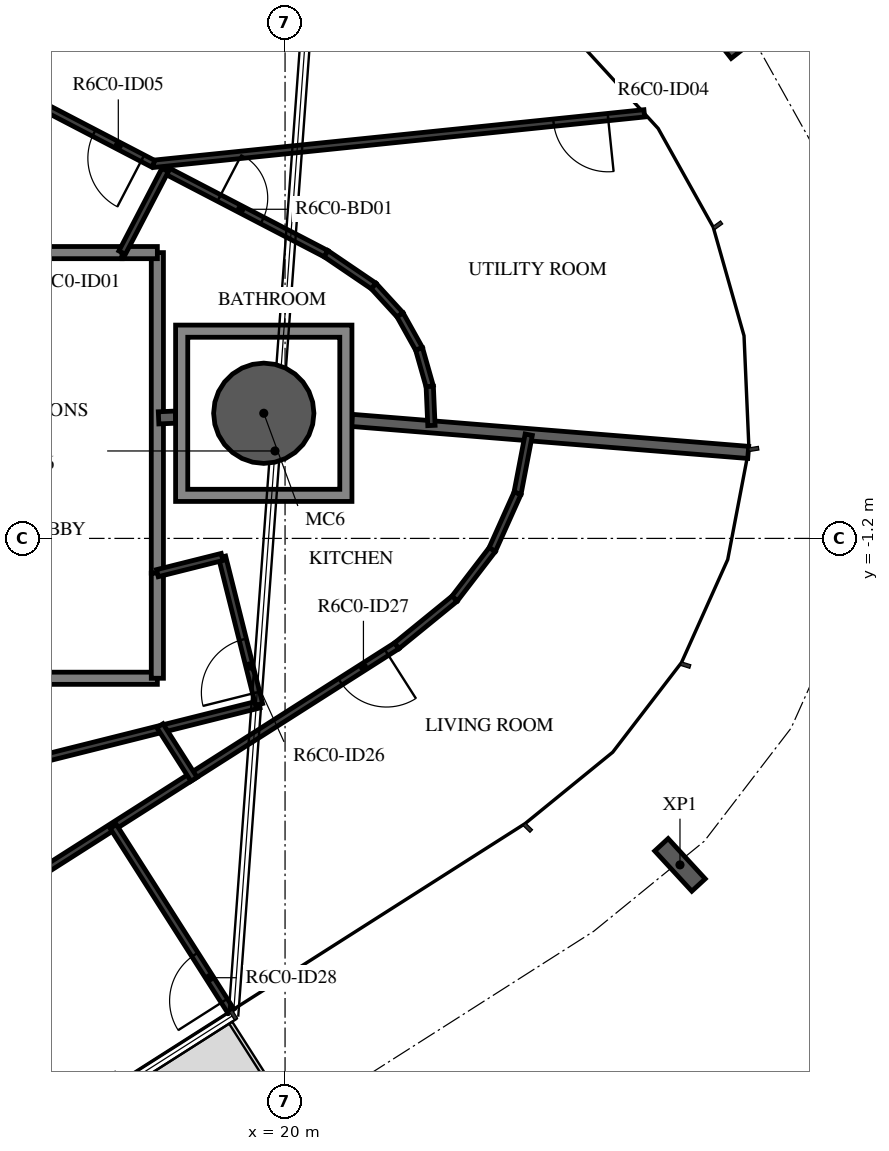
"""IFC4 building model, lengths in metres.
Left out: names, types, materials, properties, quantities, classifications, styles, units other than length and angle.
Written with IfcOpenShell. Run it as: python <this file> out.ifc"""

import sys

from ifc_helpers import new_model, si_unit, direction, frame, frame_2d, origin, origin_2d, place, context, subcontext, project, spatial, polyline, rectangle, hollow_circle, i_section, outline, extrude, element, fill, save


model = new_model("IFC4")
c1 = context("Model", 3, precision=1e-05, world=origin(), true_north=direction((0.0, 1.0)))
c2 = subcontext(c1, "Body", "Model", "MODEL_VIEW")
j1 = project(units=[si_unit("LENGTHUNIT", "METRE"), si_unit("PLANEANGLEUNIT", "RADIAN")], contexts=[c1])
p1 = place(None, origin())
s1 = spatial("IfcSite", under=j1, at=p1, CompositionType="ELEMENT")
p2 = place(p1, origin())
s2 = spatial("IfcBuilding", under=s1, at=p2, CompositionType="ELEMENT")
p3 = place(p2, frame((0.0, 0.0, 254.7)))
s3 = spatial("IfcBuildingStorey", under=s2, at=p3, CompositionType="ELEMENT", Elevation=254.7)
p4 = place(p3, frame((19.65, 0.858, -0.38), z_axis=(0.0, 0.0, 1.0), x_axis=(1.0, 0.0, 0.0)))
e1 = element("IfcColumn", 1, at=p4, inside=s3, PredefinedType="COLUMN", context=c2, shape_type="SweptSolid", body=[
    extrude(hollow_circle(Radius=0.825, WallThickness=0.04, at=origin_2d()), origin(), (0.0, 0.0, 1.0), 2.616),
])
for number, where, z_axis, x_axis in (
    (2, (26.495, -6.569, -0.38), (0.0, 0.0, 1.0), (-0.735, -0.678, 0.0)),
    (3, (27.598, 7.09, -0.38), (0.0, 0.0, 1.0), (0.617, -0.787, 0.0)),
):
    element("IfcColumn", number, at=place(p3, frame(where, z_axis=z_axis, x_axis=x_axis)), inside=s3, PredefinedType="COLUMN", context=c2, shape_type="SweptSolid", body=[
        extrude(i_section(OverallWidth=0.3, OverallDepth=0.9, WebThickness=0.019, FlangeThickness=0.035, FilletRadius=0.03, at=origin_2d()), origin(), (0.0, 0.0, 1.0), 2.616),
    ])
p5 = place(p3, frame((17.321, 3.5, 0.0), z_axis=(0.0, 0.0, 1.0), x_axis=(-1.0, 0.0, 0.0)))
e4 = element("IfcWall", 4, at=p5, inside=s3, PredefinedType="STANDARD", context=c2, shape_type="SweptSolid", body=[
    extrude(rectangle(XDim=4.061, YDim=0.2, at=frame_2d((2.03, 0.0))), origin(), (0.0, 0.0, 1.0), 3.05),
])
p6 = place(p3, frame((17.9, -1.772, 0.0), z_axis=(0.0, 0.0, 1.0), x_axis=(0.0, 1.0, 0.0)))
e5 = element("IfcWall", 5, at=p6, inside=s3, PredefinedType="STANDARD", context=c2, shape_type="SweptSolid", body=[
    extrude(rectangle(XDim=5.272, YDim=0.2, at=frame_2d((2.636, 0.0))), origin(), (0.0, 0.0, 1.0), 3.05),
])
p7 = place(p3, frame((17.9, 3.5, 0.0), z_axis=(0.0, 0.0, 1.0), x_axis=(-1.0, 0.0, 0.0)))
e6 = element("IfcWall", 6, at=p7, inside=s3, PredefinedType="STANDARD", context=c2, shape_type="SweptSolid", body=[
    extrude(rectangle(XDim=0.579, YDim=0.2, at=frame_2d((0.29, 0.0))), origin(), (0.0, 0.0, 1.0), 3.05),
])
p8 = place(p3, frame((13.285, -3.5, 0.0), z_axis=(0.0, 0.0, 1.0), x_axis=(1.0, 0.0, 0.0)))
e7 = element("IfcWall", 7, at=p8, inside=s3, PredefinedType="STANDARD", context=c2, shape_type="SweptSolid", body=[
    extrude(rectangle(XDim=4.615, YDim=0.2, at=frame_2d((2.308, 0.0))), origin(), (0.0, 0.0, 1.0), 3.05),
])
p9 = place(p3, frame((17.9, -3.5, 0.0), z_axis=(0.0, 0.0, 1.0), x_axis=(0.0, 1.0, 0.0)))
e8 = element("IfcWall", 8, at=p9, inside=s3, PredefinedType="STANDARD", context=c2, shape_type="SweptSolid", body=[
    extrude(rectangle(XDim=1.728, YDim=0.2, at=frame_2d((0.864, 0.0))), origin(), (0.0, 0.0, 1.0), 3.05),
])
p10 = place(p3, frame((21.1, 0.741, 0.0), z_axis=(0.0, 0.0, 1.0), x_axis=(0.996750718609, -0.080548153006, 0.0)))
e9 = element("IfcWall", 9, at=p10, inside=s3, PredefinedType="STANDARD", context=c2, shape_type="SweptSolid", body=[
    extrude(rectangle(XDim=6.538, YDim=0.2, at=frame_2d((3.269, 0.0))), origin(), (0.0, 0.0, 1.0), 3.05),
])
p11 = place(p3, frame((17.92, 0.782, 0.0), z_axis=(0.0, 0.0, 1.0), x_axis=(0.999051221661, 0.04355061995, 0.0)))
e10 = element("IfcWall", 10, at=p11, inside=s3, PredefinedType="STANDARD", context=c2, shape_type="SweptSolid", body=[
    extrude(rectangle(XDim=0.28, YDim=0.2, at=frame_2d((0.14, 0.0))), origin(), (0.0, 0.0, 1.0), 3.05),
])
p12 = place(p3, frame((18.028, 4.859, 0.0), z_axis=(0.0, 0.0, 1.0), x_axis=(0.88702512027, -0.46172116695, 0.0)))
e11 = element("IfcWall", 11, at=p12, inside=s3, PredefinedType="PARTITIONING", context=c2, shape_type="SweptSolid", body=[
    extrude(rectangle(XDim=2.983, YDim=0.12, at=frame_2d((1.492, 0.0))), origin(), (0.0, 0.0, 1.0), 3.05),
])
p13 = place(p12, frame((1.0, 0.0, 0.0)))
e12 = element("IfcOpeningElement", 12, at=p13, cuts=e11, PredefinedType="OPENING", context=c2, shape_type="SweptSolid", body=[
    extrude(rectangle(XDim=0.8, YDim=2.1, at=frame_2d((0.4, 1.05))), frame((0.0, 0.07, 0.0), z_axis=(0.0, -1.0, 0.0), x_axis=(1.0, 0.0, 0.0)), (0.0, 0.0, 1.0), 0.14),
])
p14 = place(p3, frame((20.674, 3.481, 0.0), z_axis=(0.0, 0.0, 1.0), x_axis=(0.827420148173, -0.56158338508, 0.0)))
e13 = element("IfcWall", 13, at=p14, inside=s3, PredefinedType="PARTITIONING", context=c2, shape_type="SweptSolid", body=[
    extrude(rectangle(XDim=0.947, YDim=0.12, at=frame_2d((0.473, 0.0))), origin(), (0.0, 0.0, 1.0), 3.05),
])
for number, where, z_axis, x_axis in (
    (14, (21.458, 2.95, 0.0), (0.0, 0.0, 1.0), (0.676, -0.737, 0.0)),
    (15, (21.891, 2.477, 0.0), (0.0, 0.0, 1.0), (0.487, -0.873, 0.0)),
):
    element("IfcWall", number, at=place(p3, frame(where, z_axis=z_axis, x_axis=x_axis)), inside=s3, PredefinedType="PARTITIONING", context=c2, shape_type="SweptSolid", body=[
        extrude(rectangle(XDim=0.642, YDim=0.12, at=frame_2d((0.321, 0.0))), origin(), (0.0, 0.0, 1.0), 3.05),
    ])
p15 = place(p3, frame((22.204, 1.916, 0.0), z_axis=(0.0, 0.0, 1.0), x_axis=(0.273013196411, -0.962010288191, 0.0)))
e16 = element("IfcWall", 16, at=p15, inside=s3, PredefinedType="PARTITIONING", context=c2, shape_type="SweptSolid", body=[
    extrude(rectangle(XDim=0.642, YDim=0.12, at=frame_2d((0.321, 0.0))), origin(), (0.0, 0.0, 1.0), 3.05),
])
p16 = place(p3, frame((22.379, 1.298, 0.0), z_axis=(0.0, 0.0, 1.0), x_axis=(0.043354705242, -0.999059742725, 0.0)))
e17 = element("IfcWall", 17, at=p16, inside=s3, PredefinedType="PARTITIONING", context=c2, shape_type="SweptSolid", body=[
    extrude(rectangle(XDim=0.642, YDim=0.12, at=frame_2d((0.321, 0.0))), origin(), (0.0, 0.0, 1.0), 3.05),
])
p17 = place(p3, frame((25.908, 5.79, 0.0), z_axis=(0.0, 0.0, 1.0), x_axis=(-0.994752982456, -0.102305932847, 0.0)))
e18 = element("IfcWall", 18, at=p17, inside=s3, PredefinedType="PARTITIONING", context=c2, shape_type="SweptSolid", body=[
    extrude(rectangle(XDim=8.116, YDim=0.12, at=frame_2d((4.058, 0.0))), origin(), (0.0, 0.0, 1.0), 3.05),
])
p18 = place(p17, frame((0.6, 0.0, 0.0)))
e19 = element("IfcOpeningElement", 19, at=p18, cuts=e18, PredefinedType="OPENING", context=c2, shape_type="SweptSolid", body=[
    extrude(rectangle(XDim=0.9, YDim=2.1, at=frame_2d((0.45, 1.05))), frame((0.0, 0.07, 0.0), z_axis=(0.0, -1.0, 0.0), x_axis=(1.0, 0.0, 0.0)), (0.0, 0.0, 1.0), 0.14),
])
p19 = place(p3, frame((18.028, 4.859, 0.0), z_axis=(0.0, 0.0, 1.0), x_axis=(-0.461688901614, -0.887041914526, 0.0)))
e20 = element("IfcWall", 20, at=p19, inside=s3, PredefinedType="PARTITIONING", context=c2, shape_type="SweptSolid", body=[
    extrude(rectangle(XDim=1.532, YDim=0.12, at=frame_2d((0.766, 0.0))), origin(), (0.0, 0.0, 1.0), 3.05),
])
p20 = place(p3, frame((17.834, 4.96, 0.0), z_axis=(0.0, 0.0, 1.0), x_axis=(-0.887008743782, 0.461752626906, 0.0)))
e21 = element("IfcWall", 21, at=p20, inside=s3, PredefinedType="PARTITIONING", context=c2, shape_type="SweptSolid", body=[
    extrude(rectangle(XDim=5.612, YDim=0.12, at=frame_2d((2.806, 0.0))), origin(), (0.0, 0.0, 1.0), 3.05),
])
p21 = place(p20, frame((0.2, 0.0, 0.0)))
e22 = element("IfcOpeningElement", 22, at=p21, cuts=e21, PredefinedType="OPENING", context=c2, shape_type="SweptSolid", body=[
    extrude(rectangle(XDim=0.9, YDim=2.1, at=frame_2d((0.45, 1.05))), frame((0.0, 0.07, 0.0), z_axis=(0.0, -1.0, 0.0), x_axis=(1.0, 0.0, 0.0)), (0.0, 0.0, 1.0), 0.14),
])
p22 = place(p3, frame((14.029, -5.32, 0.0), z_axis=(0.0, 0.0, 1.0), x_axis=(0.969999099814, 0.243108507378, 0.0)))
e23 = element("IfcWall", 23, at=p22, inside=s3, PredefinedType="PARTITIONING", context=c2, shape_type="SweptSolid", body=[
    extrude(rectangle(XDim=5.715, YDim=0.12, at=frame_2d((2.857, 0.0))), origin(), (0.0, 0.0, 1.0), 3.05),
])
p23 = place(p3, frame((19.573, -3.93, 0.0), z_axis=(0.0, 0.0, 1.0), x_axis=(-0.243155959183, 0.96998720585, 0.0)))
e24 = element("IfcWall", 24, at=p23, inside=s3, PredefinedType="PARTITIONING", context=c2, shape_type="SweptSolid", body=[
    extrude(rectangle(XDim=2.5, YDim=0.12, at=frame_2d((1.25, 0.0))), origin(), (0.0, 0.0, 1.0), 3.05),
])
p24 = place(p23, frame((0.2, 0.0, 0.0)))
e25 = element("IfcOpeningElement", 25, at=p24, cuts=e24, PredefinedType="OPENING", context=c2, shape_type="SweptSolid", body=[
    extrude(rectangle(XDim=0.9, YDim=2.1, at=frame_2d((0.45, 1.05))), frame((0.0, 0.07, 0.0), z_axis=(0.0, -1.0, 0.0), x_axis=(1.0, 0.0, 0.0)), (0.0, 0.0, 1.0), 0.14),
])
p25 = place(p3, frame((18.965, -1.505, 0.0), z_axis=(0.0, 0.0, 1.0), x_axis=(-0.969998406835, -0.243111272339, 0.0)))
e26 = element("IfcWall", 26, at=p25, inside=s3, PredefinedType="PARTITIONING", context=c2, shape_type="SweptSolid", body=[
    extrude(rectangle(XDim=1.098, YDim=0.12, at=frame_2d((0.549, 0.0))), origin(), (0.0, 0.0, 1.0), 3.05),
])
p26 = place(p3, frame((21.837, -2.966, 0.0), z_axis=(0.0, 0.0, 1.0), x_axis=(-0.843394529709, -0.537294767569, 0.0)))
e27 = element("IfcWall", 27, at=p26, inside=s3, PredefinedType="PARTITIONING", context=c2, shape_type="SweptSolid", body=[
    extrude(rectangle(XDim=11.678, YDim=0.12, at=frame_2d((5.839, 0.0))), origin(), (0.0, 0.0, 1.0), 3.05),
])
p27 = place(p26, frame((0.2, 0.0, 0.0)))
e28 = element("IfcOpeningElement", 28, at=p27, cuts=e27, PredefinedType="OPENING", context=c2, shape_type="SweptSolid", body=[
    extrude(rectangle(XDim=0.9, YDim=2.1, at=frame_2d((0.45, 1.05))), frame((0.0, 0.07, 0.0), z_axis=(0.0, -1.0, 0.0), x_axis=(1.0, 0.0, 0.0)), (0.0, 0.0, 1.0), 0.14),
])
p28 = place(p3, frame((19.109, -8.972, 0.0), z_axis=(0.0, 0.0, 1.0), x_axis=(-0.537318625891, 0.843379329999, 0.0)))
e29 = element("IfcWall", 29, at=p28, inside=s3, PredefinedType="PARTITIONING", context=c2, shape_type="SweptSolid", body=[
    extrude(rectangle(XDim=3.6, YDim=0.12, at=frame_2d((1.8, 0.0))), origin(), (0.0, 0.0, 1.0), 3.05),
])
p29 = place(p28, frame((0.2, 0.0, 0.0)))
e30 = element("IfcOpeningElement", 30, at=p29, cuts=e29, PredefinedType="OPENING", context=c2, shape_type="SweptSolid", body=[
    extrude(rectangle(XDim=0.9, YDim=2.1, at=frame_2d((0.45, 1.05))), frame((0.0, 0.07, 0.0), z_axis=(0.0, -1.0, 0.0), x_axis=(1.0, 0.0, 0.0)), (0.0, 0.0, 1.0), 0.14),
])
p30 = place(p3, frame((18.503, -5.161, 0.0), z_axis=(0.0, 0.0, 1.0), x_axis=(-0.537208231854, 0.843449652101, 0.0)))
e31 = element("IfcWall", 31, at=p30, inside=s3, PredefinedType="PARTITIONING", context=c2, shape_type="SweptSolid", body=[
    extrude(rectangle(XDim=1.044, YDim=0.12, at=frame_2d((0.522, 0.0))), origin(), (0.0, 0.0, 1.0), 3.05),
])
p31 = place(p3, frame((24.007, 0.506, 0.0), z_axis=(0.0, 0.0, 1.0), x_axis=(-0.187878189528, -0.98219233651, 0.0)))
e32 = element("IfcWall", 32, at=p31, inside=s3, PredefinedType="PARTITIONING", context=c2, shape_type="SweptSolid", body=[
    extrude(rectangle(XDim=0.981, YDim=0.12, at=frame_2d((0.491, 0.0))), origin(), (0.0, 0.0, 1.0), 3.05),
])
p32 = place(p3, frame((23.823, -0.458, 0.0), z_axis=(0.0, 0.0, 1.0), x_axis=(-0.409435319137, -0.912339147161, 0.0)))
e33 = element("IfcWall", 33, at=p32, inside=s3, PredefinedType="PARTITIONING", context=c2, shape_type="SweptSolid", body=[
    extrude(rectangle(XDim=1.016, YDim=0.12, at=frame_2d((0.508, 0.0))), origin(), (0.0, 0.0, 1.0), 3.05),
])
p33 = place(p3, frame((23.407, -1.385, 0.0), z_axis=(0.0, 0.0, 1.0), x_axis=(-0.608769538934, -0.793347117261, 0.0)))
e34 = element("IfcWall", 34, at=p33, inside=s3, PredefinedType="PARTITIONING", context=c2, shape_type="SweptSolid", body=[
    extrude(rectangle(XDim=1.016, YDim=0.12, at=frame_2d((0.508, 0.0))), origin(), (0.0, 0.0, 1.0), 3.05),
])
p34 = place(p3, frame((22.789, -2.191, 0.0), z_axis=(0.0, 0.0, 1.0), x_axis=(-0.775267457727, -0.631633096813, 0.0)))
e35 = element("IfcWall", 35, at=p34, inside=s3, PredefinedType="PARTITIONING", context=c2, shape_type="SweptSolid", body=[
    extrude(rectangle(XDim=1.227, YDim=0.12, at=frame_2d((0.614, 0.0))), origin(), (0.0, 0.0, 1.0), 3.05),
])
p35 = place(p3, origin())
e36 = element("IfcWall", 36, at=p35, inside=s3, PredefinedType="STANDARD", context=c2, shape_type="SweptSolid", body=[
    extrude(outline(polyline([(21.1, 2.308), (21.1, -0.592), (18.2, -0.592), (18.2, 2.308), (21.1, 2.308)]), holes=[polyline([(18.4, -0.392), (20.9, -0.392), (20.9, 2.108), (18.4, 2.108), (18.4, -0.392)])]), origin(), (0.0, 0.0, 1.0), 3.05),
])
p36 = place(p18, origin())
e37 = element("IfcDoor", 37, at=p36, inside=s3, OperationType="SINGLE_SWING_LEFT", PredefinedType="DOOR", context=c2, shape_type="SweptSolid", body=[
    extrude(rectangle(XDim=0.9, YDim=2.1, at=frame_2d((0.45, 1.05))), frame((0.0, 0.025, 0.0), z_axis=(0.0, -1.0, 0.0), x_axis=(1.0, 0.0, 0.0)), (0.0, 0.0, 1.0), 0.05),
])
fill(e19, e37)
p37 = place(p13, origin())
e38 = element("IfcDoor", 38, at=p37, inside=s3, OperationType="SINGLE_SWING_RIGHT", PredefinedType="DOOR", context=c2, shape_type="SweptSolid", body=[
    extrude(rectangle(XDim=0.8, YDim=2.1, at=frame_2d((0.4, 1.05))), frame((0.0, 0.025, 0.0), z_axis=(0.0, -1.0, 0.0), x_axis=(1.0, 0.0, 0.0)), (0.0, 0.0, 1.0), 0.05),
])
fill(e12, e38)
p38 = place(p21, origin())
e39 = element("IfcDoor", 39, at=p38, inside=s3, OperationType="SINGLE_SWING_RIGHT", PredefinedType="DOOR", context=c2, shape_type="SweptSolid", body=[
    extrude(rectangle(XDim=0.9, YDim=2.1, at=frame_2d((0.45, 1.05))), frame((0.0, 0.025, 0.0), z_axis=(0.0, -1.0, 0.0), x_axis=(1.0, 0.0, 0.0)), (0.0, 0.0, 1.0), 0.05),
])
fill(e22, e39)
p39 = place(p24, origin())
e40 = element("IfcDoor", 40, at=p39, inside=s3, OperationType="SINGLE_SWING_RIGHT", PredefinedType="DOOR", context=c2, shape_type="SweptSolid", body=[
    extrude(rectangle(XDim=0.9, YDim=2.1, at=frame_2d((0.45, 1.05))), frame((0.0, 0.025, 0.0), z_axis=(0.0, -1.0, 0.0), x_axis=(1.0, 0.0, 0.0)), (0.0, 0.0, 1.0), 0.05),
])
fill(e25, e40)
p40 = place(p27, origin())
e41 = element("IfcDoor", 41, at=p40, inside=s3, OperationType="SINGLE_SWING_RIGHT", PredefinedType="DOOR", context=c2, shape_type="SweptSolid", body=[
    extrude(rectangle(XDim=0.9, YDim=2.1, at=frame_2d((0.45, 1.05))), frame((0.0, 0.025, 0.0), z_axis=(0.0, -1.0, 0.0), x_axis=(1.0, 0.0, 0.0)), (0.0, 0.0, 1.0), 0.05),
])
fill(e28, e41)
p41 = place(p29, origin())
e42 = element("IfcDoor", 42, at=p41, inside=s3, OperationType="SINGLE_SWING_LEFT", PredefinedType="DOOR", context=c2, shape_type="SweptSolid", body=[
    extrude(rectangle(XDim=0.9, YDim=2.1, at=frame_2d((0.45, 1.05))), frame((0.0, 0.025, 0.0), z_axis=(0.0, -1.0, 0.0), x_axis=(1.0, 0.0, 0.0)), (0.0, 0.0, 1.0), 0.05),
])
fill(e30, e42)
save(model, sys.argv[1])
